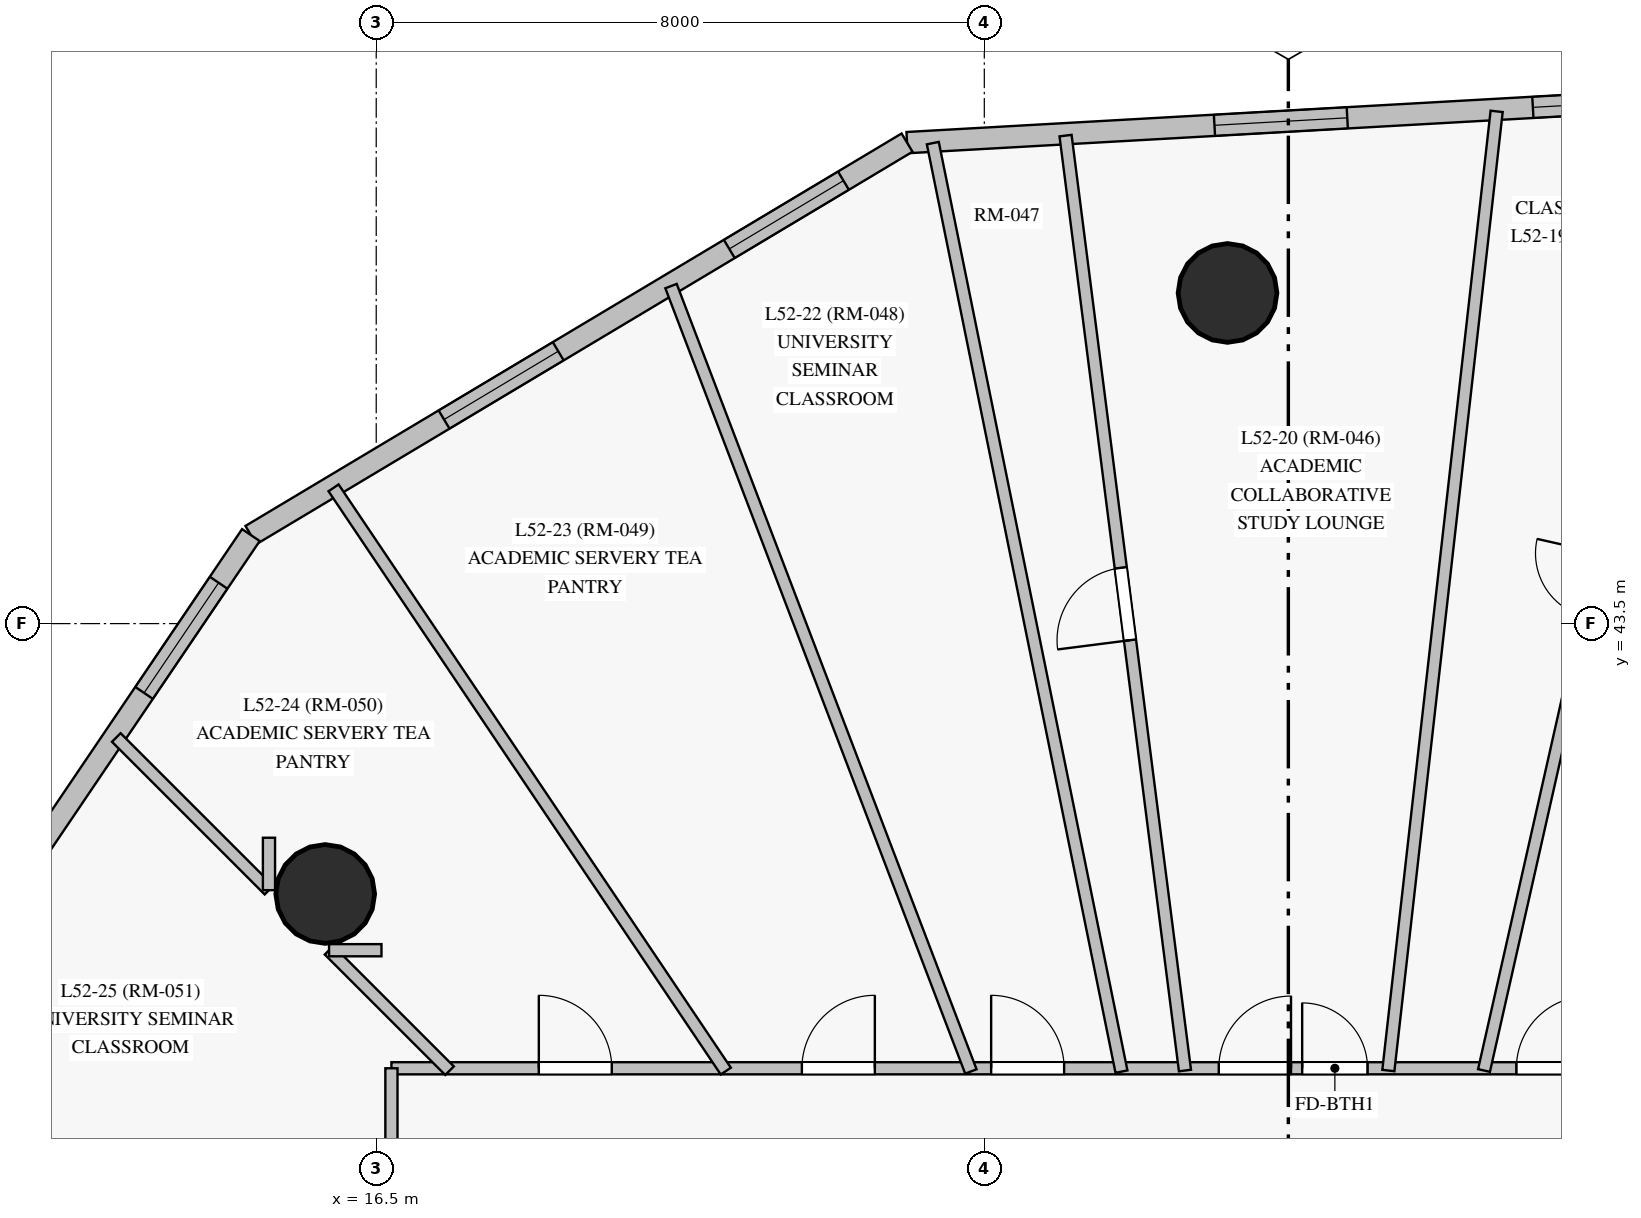
"""IFC4 building model, lengths in metres.
Left out: names, types, materials, properties, quantities, classifications, styles, units other than length and angle.
Written with IfcOpenShell. Run it as: python <this file> out.ifc"""

import sys

from ifc_helpers import new_model, si_unit, direction, frame, frame_2d, origin, origin_with_axes, origin_2d, place, context, subcontext, project, spatial, rectangle, circle, extrude, source, transform, mapped, element, fill, save


model = new_model("IFC4")
c1 = context("Model", 3, precision=1e-05, world=origin(), true_north=direction((0.0, 1.0)))
c2 = subcontext(c1, "Body", "Model", "MODEL_VIEW")
j1 = project(units=[si_unit("LENGTHUNIT", "METRE"), si_unit("PLANEANGLEUNIT", "RADIAN")], contexts=[c1])
p1 = place(None, origin())
s1 = spatial("IfcSite", under=j1, at=p1, CompositionType="ELEMENT")
p2 = place(p1, origin())
s2 = spatial("IfcBuilding", under=s1, at=p2, CompositionType="ELEMENT")
p3 = place(p2, frame((0.0, 0.0, 180.95)))
s3 = spatial("IfcBuildingStorey", under=s2, at=p3, CompositionType="ELEMENT", Elevation=180.95)
m1 = source(origin_with_axes(), c2, "Body", "SweptSolid", [
    extrude(circle(Radius=0.65, at=origin_2d()), origin(), (0.0, 0.0, 1.0), 3.05),
])
for number, where, z_axis, x_axis in (
    (1, (27.7, 47.85, 0.0), (0.0, 0.0, 1.0), (1.0, 0.0, 0.0)),
    (2, (15.829, 39.943, 0.0), (0.0, 0.0, 1.0), (1.0, 0.0, 0.0)),
):
    element("IfcColumn", number, at=place(p3, frame(where, z_axis=z_axis, x_axis=x_axis)), inside=s3, PredefinedType="COLUMN", context=c2, shape_type="MappedRepresentation", body=[
        mapped(m1, transform((0.0, 0.0, 0.0), scale=1.0)),
    ])
p4 = place(p3, frame((36.3, 50.55, 0.0), z_axis=(0.0, 0.0, 1.0), x_axis=(-0.998416329784, -0.056256843315, 0.0)))
e3 = element("IfcWall", 3, at=p4, inside=s3, PredefinedType="SOLIDWALL", context=c2, shape_type="SweptSolid", body=[
    extrude(rectangle(XDim=12.837, YDim=0.28, at=frame_2d((6.418, 0.0))), origin(), (0.0, 0.0, 1.0), 2.825),
])
p5 = place(p4, frame((0.733, 0.0, 0.85)))
e4 = element("IfcOpeningElement", 4, at=p5, cuts=e3, PredefinedType="OPENING", context=c2, shape_type="SweptSolid", body=[
    extrude(rectangle(XDim=0.95, YDim=1.5, at=frame_2d((0.475, 0.75))), frame((0.0, 0.15, 0.0), z_axis=(0.0, -1.0, 0.0), x_axis=(1.0, 0.0, 0.0)), (0.0, 0.0, 1.0), 0.3),
])
p6 = place(p4, frame((2.841, 0.0, 0.85)))
e5 = element("IfcOpeningElement", 5, at=p6, cuts=e3, PredefinedType="OPENING", context=c2, shape_type="SweptSolid", body=[
    extrude(rectangle(XDim=1.75, YDim=1.65, at=frame_2d((0.875, 0.825))), frame((0.0, 0.15, 0.0), z_axis=(0.0, -1.0, 0.0), x_axis=(1.0, 0.0, 0.0)), (0.0, 0.0, 1.0), 0.3),
])
p7 = place(p4, frame((7.036, 0.0, 0.85)))
e6 = element("IfcOpeningElement", 6, at=p7, cuts=e3, PredefinedType="OPENING", context=c2, shape_type="SweptSolid", body=[
    extrude(rectangle(XDim=1.75, YDim=1.65, at=frame_2d((0.875, 0.825))), frame((0.0, 0.15, 0.0), z_axis=(0.0, -1.0, 0.0), x_axis=(1.0, 0.0, 0.0)), (0.0, 0.0, 1.0), 0.3),
])
p8 = place(p3, frame((23.484, 49.828, 0.0), z_axis=(0.0, 0.0, 1.0), x_axis=(-0.858224492281, -0.51327450828, 0.0)))
e7 = element("IfcWall", 7, at=p8, inside=s3, PredefinedType="SOLIDWALL", context=c2, shape_type="SweptSolid", body=[
    extrude(rectangle(XDim=10.059, YDim=0.28, at=frame_2d((5.029, 0.0))), origin(), (0.0, 0.0, 1.0), 2.825),
])
p9 = place(p8, frame((0.975, 0.0, 0.85)))
e8 = element("IfcOpeningElement", 8, at=p9, cuts=e7, PredefinedType="OPENING", context=c2, shape_type="SweptSolid", body=[
    extrude(rectangle(XDim=1.75, YDim=1.65, at=frame_2d((0.875, 0.825))), frame((0.0, 0.15, 0.0), z_axis=(0.0, -1.0, 0.0), x_axis=(1.0, 0.0, 0.0)), (0.0, 0.0, 1.0), 0.3),
])
p10 = place(p8, frame((5.347, 0.0, 0.85)))
e9 = element("IfcOpeningElement", 9, at=p10, cuts=e7, PredefinedType="OPENING", context=c2, shape_type="SweptSolid", body=[
    extrude(rectangle(XDim=1.75, YDim=1.65, at=frame_2d((0.875, 0.825))), frame((0.0, 0.15, 0.0), z_axis=(0.0, -1.0, 0.0), x_axis=(1.0, 0.0, 0.0)), (0.0, 0.0, 1.0), 0.3),
])
p11 = place(p3, frame((14.851, 44.665, 0.0), z_axis=(0.0, 0.0, 1.0), x_axis=(-0.560470947108, -0.828174086439, 0.0)))
e10 = element("IfcWall", 10, at=p11, inside=s3, PredefinedType="SOLIDWALL", context=c2, shape_type="SweptSolid", body=[
    extrude(rectangle(XDim=14.085, YDim=0.28, at=frame_2d((7.042, 0.0))), origin(), (0.0, 0.0, 1.0), 2.825),
])
p12 = place(p11, frame((0.757, 0.0, 0.85)))
e11 = element("IfcOpeningElement", 11, at=p12, cuts=e10, PredefinedType="OPENING", context=c2, shape_type="SweptSolid", body=[
    extrude(rectangle(XDim=1.75, YDim=1.65, at=frame_2d((0.875, 0.825))), frame((0.0, 0.15, 0.0), z_axis=(0.0, -1.0, 0.0), x_axis=(1.0, 0.0, 0.0)), (0.0, 0.0, 1.0), 0.3),
])
p13 = place(p11, frame((5.603, 0.0, 0.85)))
e12 = element("IfcOpeningElement", 12, at=p13, cuts=e10, PredefinedType="OPENING", context=c2, shape_type="SweptSolid", body=[
    extrude(rectangle(XDim=1.75, YDim=1.65, at=frame_2d((0.875, 0.825))), frame((0.0, 0.15, 0.0), z_axis=(0.0, -1.0, 0.0), x_axis=(1.0, 0.0, 0.0)), (0.0, 0.0, 1.0), 0.3),
])
p14 = place(p11, frame((11.013, 0.0, 0.85)))
e13 = element("IfcOpeningElement", 13, at=p14, cuts=e10, PredefinedType="OPENING", context=c2, shape_type="SweptSolid", body=[
    extrude(rectangle(XDim=1.75, YDim=1.65, at=frame_2d((0.875, 0.825))), frame((0.0, 0.15, 0.0), z_axis=(0.0, -1.0, 0.0), x_axis=(1.0, 0.0, 0.0)), (0.0, 0.0, 1.0), 0.3),
])
p15 = place(p3, frame((16.7, 37.65, 0.0), z_axis=(0.0, 0.0, 1.0), x_axis=(1.0, 0.0, 0.0)))
e14 = element("IfcWall", 14, at=p15, inside=s3, PredefinedType="PARTITIONING", context=c2, shape_type="SweptSolid", body=[
    extrude(rectangle(XDim=23.5, YDim=0.16, at=frame_2d((11.75, 0.0))), origin(), (0.0, 0.0, 1.0), 2.375),
])
p16 = place(p15, frame((20.759, 0.0, 0.0)))
e15 = element("IfcOpeningElement", 15, at=p16, cuts=e14, PredefinedType="OPENING", context=c2, shape_type="SweptSolid", body=[
    extrude(rectangle(XDim=0.96, YDim=2.15, at=frame_2d((0.48, 1.075))), frame((0.0, 0.09, 0.0), z_axis=(0.0, -1.0, 0.0), x_axis=(1.0, 0.0, 0.0)), (0.0, 0.0, 1.0), 0.18),
])
p17 = place(p15, frame((17.15, 0.0, 0.0)))
e16 = element("IfcOpeningElement", 16, at=p17, cuts=e14, PredefinedType="OPENING", context=c2, shape_type="SweptSolid", body=[
    extrude(rectangle(XDim=0.96, YDim=2.15, at=frame_2d((0.48, 1.075))), frame((0.0, 0.09, 0.0), z_axis=(0.0, -1.0, 0.0), x_axis=(1.0, 0.0, 0.0)), (0.0, 0.0, 1.0), 0.18),
])
p18 = place(p15, frame((14.8, 0.0, 0.0)))
e17 = element("IfcOpeningElement", 17, at=p18, cuts=e14, PredefinedType="OPENING", context=c2, shape_type="SweptSolid", body=[
    extrude(rectangle(XDim=0.95, YDim=2.15, at=frame_2d((0.475, 1.075))), frame((0.0, 0.09, 0.0), z_axis=(0.0, -1.0, 0.0), x_axis=(1.0, 0.0, 0.0)), (0.0, 0.0, 1.0), 0.18),
])
p19 = place(p15, frame((11.982, 0.0, 0.0)))
e18 = element("IfcOpeningElement", 18, at=p19, cuts=e14, PredefinedType="OPENING", context=c2, shape_type="SweptSolid", body=[
    extrude(rectangle(XDim=0.86, YDim=2.1, at=frame_2d((0.43, 1.05))), frame((0.0, 0.09, 0.0), z_axis=(0.0, -1.0, 0.0), x_axis=(1.0, 0.0, 0.0)), (0.0, 0.0, 1.0), 0.18),
])
p20 = place(p15, frame((10.885, 0.0, 0.0)))
e19 = element("IfcOpeningElement", 19, at=p20, cuts=e14, PredefinedType="OPENING", context=c2, shape_type="SweptSolid", body=[
    extrude(rectangle(XDim=0.95, YDim=2.15, at=frame_2d((0.475, 1.075))), frame((0.0, 0.09, 0.0), z_axis=(0.0, -1.0, 0.0), x_axis=(1.0, 0.0, 0.0)), (0.0, 0.0, 1.0), 0.18),
])
p21 = place(p15, frame((7.89, 0.0, 0.0)))
e20 = element("IfcOpeningElement", 20, at=p21, cuts=e14, PredefinedType="OPENING", context=c2, shape_type="SweptSolid", body=[
    extrude(rectangle(XDim=0.96, YDim=2.15, at=frame_2d((0.48, 1.075))), frame((0.0, 0.09, 0.0), z_axis=(0.0, -1.0, 0.0), x_axis=(1.0, 0.0, 0.0)), (0.0, 0.0, 1.0), 0.18),
])
p22 = place(p15, frame((5.4, 0.0, 0.0)))
e21 = element("IfcOpeningElement", 21, at=p22, cuts=e14, PredefinedType="OPENING", context=c2, shape_type="SweptSolid", body=[
    extrude(rectangle(XDim=0.96, YDim=2.15, at=frame_2d((0.48, 1.075))), frame((0.0, 0.09, 0.0), z_axis=(0.0, -1.0, 0.0), x_axis=(1.0, 0.0, 0.0)), (0.0, 0.0, 1.0), 0.18),
])
p23 = place(p15, frame((1.939, 0.0, 0.0)))
e22 = element("IfcOpeningElement", 22, at=p23, cuts=e14, PredefinedType="OPENING", context=c2, shape_type="SweptSolid", body=[
    extrude(rectangle(XDim=0.96, YDim=2.15, at=frame_2d((0.48, 1.075))), frame((0.0, 0.09, 0.0), z_axis=(0.0, -1.0, 0.0), x_axis=(1.0, 0.0, 0.0)), (0.0, 0.0, 1.0), 0.18),
])
p24 = place(p3, frame((16.7, 15.35, 0.0), z_axis=(0.0, 0.0, 1.0), x_axis=(0.0, 1.0, 0.0)))
e23 = element("IfcWall", 23, at=p24, inside=s3, PredefinedType="PARTITIONING", context=c2, shape_type="SweptSolid", body=[
    extrude(rectangle(XDim=22.3, YDim=0.16, at=frame_2d((11.15, 0.0))), origin(), (0.0, 0.0, 1.0), 2.275),
])
p25 = place(p24, frame((9.315, 0.0, 0.0)))
e24 = element("IfcOpeningElement", 24, at=p25, cuts=e23, PredefinedType="OPENING", context=c2, shape_type="SweptSolid", body=[
    extrude(rectangle(XDim=0.95, YDim=2.15, at=frame_2d((0.475, 1.075))), frame((0.0, 0.09, 0.0), z_axis=(0.0, -1.0, 0.0), x_axis=(1.0, 0.0, 0.0)), (0.0, 0.0, 1.0), 0.18),
])
p26 = place(p24, frame((7.33, 0.0, 0.0)))
e25 = element("IfcOpeningElement", 25, at=p26, cuts=e23, PredefinedType="OPENING", context=c2, shape_type="SweptSolid", body=[
    extrude(rectangle(XDim=0.96, YDim=2.15, at=frame_2d((0.48, 1.075))), frame((0.0, 0.09, 0.0), z_axis=(0.0, -1.0, 0.0), x_axis=(1.0, 0.0, 0.0)), (0.0, 0.0, 1.0), 0.18),
])
p27 = place(p24, frame((1.021, 0.0, 0.0)))
e26 = element("IfcOpeningElement", 26, at=p27, cuts=e23, PredefinedType="OPENING", context=c2, shape_type="SweptSolid", body=[
    extrude(rectangle(XDim=0.95, YDim=2.15, at=frame_2d((0.475, 1.075))), frame((0.0, 0.09, 0.0), z_axis=(0.0, -1.0, 0.0), x_axis=(1.0, 0.0, 0.0)), (0.0, 0.0, 1.0), 0.18),
])
p28 = place(p24, frame((18.396, 0.0, 0.0)))
e27 = element("IfcOpeningElement", 27, at=p28, cuts=e23, PredefinedType="OPENING", context=c2, shape_type="SweptSolid", body=[
    extrude(rectangle(XDim=0.96, YDim=2.15, at=frame_2d((0.48, 1.075))), frame((0.0, 0.09, 0.0), z_axis=(0.0, -1.0, 0.0), x_axis=(1.0, 0.0, 0.0)), (0.0, 0.0, 1.0), 0.18),
])
p29 = place(p24, frame((14.36, 0.0, 0.0)))
e28 = element("IfcOpeningElement", 28, at=p29, cuts=e23, PredefinedType="OPENING", context=c2, shape_type="SweptSolid", body=[
    extrude(rectangle(XDim=0.96, YDim=2.15, at=frame_2d((0.48, 1.075))), frame((0.0, 0.09, 0.0), z_axis=(0.0, -1.0, 0.0), x_axis=(1.0, 0.0, 0.0)), (0.0, 0.0, 1.0), 0.18),
])
p30 = place(p24, frame((11.115, 0.0, 0.0)))
e29 = element("IfcOpeningElement", 29, at=p30, cuts=e23, PredefinedType="OPENING", context=c2, shape_type="SweptSolid", body=[
    extrude(rectangle(XDim=0.95, YDim=2.15, at=frame_2d((0.475, 1.075))), frame((0.0, 0.09, 0.0), z_axis=(0.0, -1.0, 0.0), x_axis=(1.0, 0.0, 0.0)), (0.0, 0.0, 1.0), 0.18),
])
p31 = place(p3, frame((31.074, 37.621, 0.0), z_axis=(0.0, 0.0, 1.0), x_axis=(0.220370767659, 0.975416180285, 0.0)))
e30 = element("IfcWall", 30, at=p31, inside=s3, PredefinedType="PARTITIONING", context=c2, shape_type="SweptSolid", body=[
    extrude(rectangle(XDim=13.092, YDim=0.16, at=frame_2d((6.546, 0.0))), origin(), (0.0, 0.0, 1.0), 2.825),
])
p32 = place(p31, frame((6.116, 0.0, 0.0)))
e31 = element("IfcOpeningElement", 31, at=p32, cuts=e30, PredefinedType="OPENING", context=c2, shape_type="SweptSolid", body=[
    extrude(rectangle(XDim=0.86, YDim=2.04, at=frame_2d((0.43, 1.02))), frame((0.0, 0.09, 0.0), z_axis=(0.0, -1.0, 0.0), x_axis=(1.0, 0.0, 0.0)), (0.0, 0.0, 1.0), 0.18),
])
p33 = place(p3, frame((29.816, 37.62, 0.0), z_axis=(0.0, 0.0, 1.0), x_axis=(0.112180638673, 0.993687830411, 0.0)))
e32 = element("IfcWall", 32, at=p33, inside=s3, PredefinedType="PARTITIONING", context=c2, shape_type="SweptSolid", body=[
    extrude(rectangle(XDim=12.699, YDim=0.16, at=frame_2d((6.349, 0.0))), origin(), (0.0, 0.0, 1.0), 2.825),
])
p34 = place(p3, frame((26.305, 37.606, 0.0), z_axis=(0.0, 0.0, 1.0), x_axis=(-0.199132224826, 0.979972630759, 0.0)))
e33 = element("IfcWall", 33, at=p34, inside=s3, PredefinedType="PARTITIONING", context=c2, shape_type="SweptSolid", body=[
    extrude(rectangle(XDim=12.465, YDim=0.16, at=frame_2d((6.232, 0.0))), origin(), (0.0, 0.0, 1.0), 2.275),
])
p35 = place(p3, frame((27.14, 37.62, 0.0), z_axis=(0.0, 0.0, 1.0), x_axis=(-0.126699899655, 0.991941094737, 0.0)))
e34 = element("IfcWall", 34, at=p35, inside=s3, PredefinedType="PARTITIONING", context=c2, shape_type="SweptSolid", body=[
    extrude(rectangle(XDim=12.4, YDim=0.16, at=frame_2d((6.2, 0.0))), origin(), (0.0, 0.0, 1.0), 2.275),
])
p36 = place(p35, frame((5.708, 0.0, 0.0)))
e35 = element("IfcOpeningElement", 35, at=p36, cuts=e34, PredefinedType="OPENING", context=c2, shape_type="SweptSolid", body=[
    extrude(rectangle(XDim=0.96, YDim=2.15, at=frame_2d((0.48, 1.075))), frame((0.0, 0.09, 0.0), z_axis=(0.0, -1.0, 0.0), x_axis=(1.0, 0.0, 0.0)), (0.0, 0.0, 1.0), 0.18),
])
p37 = place(p3, frame((24.323, 37.608, 0.0), z_axis=(0.0, 0.0, 1.0), x_axis=(-0.356683700692, 0.934225207142, 0.0)))
e36 = element("IfcWall", 36, at=p37, inside=s3, PredefinedType="PARTITIONING", context=c2, shape_type="SweptSolid", body=[
    extrude(rectangle(XDim=11.06, YDim=0.16, at=frame_2d((5.53, 0.0))), origin(), (0.0, 0.0, 1.0), 2.825),
])
p38 = place(p3, frame((21.099, 37.613, 0.0), z_axis=(0.0, 0.0, 1.0), x_axis=(-0.558064985306, 0.829797247631, 0.0)))
e37 = element("IfcWall", 37, at=p38, inside=s3, PredefinedType="PARTITIONING", context=c2, shape_type="SweptSolid", body=[
    extrude(rectangle(XDim=9.247, YDim=0.16, at=frame_2d((4.624, 0.0))), origin(), (0.0, 0.0, 1.0), 2.825),
])
p39 = place(p3, frame((15.089, 39.993, 0.0), z_axis=(0.0, 0.0, 1.0), x_axis=(-0.70723570156, 0.706977837304, 0.0)))
e38 = element("IfcWall", 38, at=p39, inside=s3, PredefinedType="PARTITIONING", context=c2, shape_type="SweptSolid", body=[
    extrude(rectangle(XDim=2.84, YDim=0.16, at=frame_2d((1.42, 0.0))), origin(), (0.0, 0.0, 1.0), 2.825),
])
p40 = place(p3, frame((17.465, 37.618, 0.0), z_axis=(0.0, 0.0, 1.0), x_axis=(-0.70721569251, 0.706997853085, 0.0)))
e39 = element("IfcWall", 39, at=p40, inside=s3, PredefinedType="PARTITIONING", context=c2, shape_type="SweptSolid", body=[
    extrude(rectangle(XDim=2.241, YDim=0.16, at=frame_2d((1.121, 0.0))), origin(), (0.0, 0.0, 1.0), 2.275),
])
p41 = place(p3, frame((15.089, 40.683, 0.0), z_axis=(0.0, 0.0, 1.0), x_axis=(0.0, -1.0, 0.0)))
e40 = element("IfcWall", 40, at=p41, inside=s3, PredefinedType="PARTITIONING", context=c2, shape_type="SweptSolid", body=[
    extrude(rectangle(XDim=0.69, YDim=0.16, at=frame_2d((0.345, 0.0))), origin(), (0.0, 0.0, 1.0), 2.825),
])
p42 = place(p3, frame((15.879, 39.203, 0.0), z_axis=(0.0, 0.0, 1.0), x_axis=(1.0, 0.0, 0.0)))
e41 = element("IfcWall", 41, at=p42, inside=s3, PredefinedType="PARTITIONING", context=c2, shape_type="SweptSolid", body=[
    extrude(rectangle(XDim=0.69, YDim=0.16, at=frame_2d((0.345, 0.0))), origin(), (0.0, 0.0, 1.0), 2.495),
])
m2 = source(origin_with_axes(), c2, "Body", "SweptSolid", [
    extrude(rectangle(XDim=1.75, YDim=1.65, at=frame_2d((0.875, 0.825))), frame((0.0, 0.03, 0.0), z_axis=(0.0, -1.0, 0.0), x_axis=(1.0, 0.0, 0.0)), (0.0, 0.0, 1.0), 0.06),
])
p43 = place(p6, origin())
e42 = element("IfcWindow", 42, at=p43, inside=s3, PartitioningType="SINGLE_PANEL", PredefinedType="WINDOW", context=c2, shape_type="MappedRepresentation", body=[
    mapped(m2, transform((0.0, 0.0, 0.0), scale=1.0)),
])
fill(e5, e42)
p44 = place(p7, origin())
e43 = element("IfcWindow", 43, at=p44, inside=s3, PartitioningType="SINGLE_PANEL", PredefinedType="WINDOW", context=c2, shape_type="MappedRepresentation", body=[
    mapped(m2, transform((0.0, 0.0, 0.0), scale=1.0)),
])
fill(e6, e43)
p45 = place(p9, origin())
e44 = element("IfcWindow", 44, at=p45, inside=s3, PartitioningType="SINGLE_PANEL", PredefinedType="WINDOW", context=c2, shape_type="MappedRepresentation", body=[
    mapped(m2, transform((0.0, 0.0, 0.0), scale=1.0)),
])
fill(e8, e44)
p46 = place(p10, origin())
e45 = element("IfcWindow", 45, at=p46, inside=s3, PartitioningType="SINGLE_PANEL", PredefinedType="WINDOW", context=c2, shape_type="MappedRepresentation", body=[
    mapped(m2, transform((0.0, 0.0, 0.0), scale=1.0)),
])
fill(e9, e45)
p47 = place(p12, origin())
e46 = element("IfcWindow", 46, at=p47, inside=s3, PartitioningType="SINGLE_PANEL", PredefinedType="WINDOW", context=c2, shape_type="MappedRepresentation", body=[
    mapped(m2, transform((0.0, 0.0, 0.0), scale=1.0)),
])
fill(e11, e46)
m3 = source(origin_with_axes(), c2, "Body", "SweptSolid", [
    extrude(rectangle(XDim=0.95, YDim=2.15, at=frame_2d((0.475, 1.075))), frame((0.0, 0.025, 0.0), z_axis=(0.0, -1.0, 0.0), x_axis=(1.0, 0.0, 0.0)), (0.0, 0.0, 1.0), 0.05),
])
p48 = place(p18, origin())
e47 = element("IfcDoor", 47, at=p48, inside=s3, OperationType="SINGLE_SWING_RIGHT", PredefinedType="DOOR", context=c2, shape_type="MappedRepresentation", body=[
    mapped(m3, transform((0.0, 0.0, 0.0), scale=1.0)),
])
fill(e17, e47)
m4 = source(origin_with_axes(), c2, "Body", "SweptSolid", [
    extrude(rectangle(XDim=0.86, YDim=2.1, at=frame_2d((0.43, 1.05))), frame((0.0, 0.025, 0.0), z_axis=(0.0, -1.0, 0.0), x_axis=(1.0, 0.0, 0.0)), (0.0, 0.0, 1.0), 0.05),
])
p49 = place(p19, origin())
e48 = element("IfcDoor", 48, at=p49, inside=s3, OperationType="SINGLE_SWING_LEFT", PredefinedType="DOOR", context=c2, shape_type="MappedRepresentation", body=[
    mapped(m4, transform((0.0, 0.0, 0.0), scale=1.0)),
])
fill(e18, e48)
p50 = place(p20, origin())
e49 = element("IfcDoor", 49, at=p50, inside=s3, OperationType="SINGLE_SWING_RIGHT", PredefinedType="DOOR", context=c2, shape_type="MappedRepresentation", body=[
    mapped(m3, transform((0.0, 0.0, 0.0), scale=1.0)),
])
fill(e19, e49)
m5 = source(origin_with_axes(), c2, "Body", "SweptSolid", [
    extrude(rectangle(XDim=0.96, YDim=2.15, at=frame_2d((0.48, 1.075))), frame((0.0, 0.025, 0.0), z_axis=(0.0, -1.0, 0.0), x_axis=(1.0, 0.0, 0.0)), (0.0, 0.0, 1.0), 0.05),
])
p51 = place(p21, origin())
e50 = element("IfcDoor", 50, at=p51, inside=s3, OperationType="SINGLE_SWING_LEFT", PredefinedType="DOOR", context=c2, shape_type="MappedRepresentation", body=[
    mapped(m5, transform((0.0, 0.0, 0.0), scale=1.0)),
])
fill(e20, e50)
p52 = place(p22, origin())
e51 = element("IfcDoor", 51, at=p52, inside=s3, OperationType="SINGLE_SWING_RIGHT", PredefinedType="DOOR", context=c2, shape_type="MappedRepresentation", body=[
    mapped(m5, transform((0.0, 0.0, 0.0), scale=1.0)),
])
fill(e21, e51)
p53 = place(p23, origin())
e52 = element("IfcDoor", 52, at=p53, inside=s3, OperationType="SINGLE_SWING_LEFT", PredefinedType="DOOR", context=c2, shape_type="MappedRepresentation", body=[
    mapped(m5, transform((0.0, 0.0, 0.0), scale=1.0)),
])
fill(e22, e52)
p54 = place(p36, origin())
e53 = element("IfcDoor", 53, at=p54, inside=s3, OperationType="SINGLE_SWING_LEFT", PredefinedType="DOOR", context=c2, shape_type="MappedRepresentation", body=[
    mapped(m5, transform((0.0, 0.0, 0.0), scale=1.0)),
])
fill(e35, e53)
save(model, sys.argv[1])
